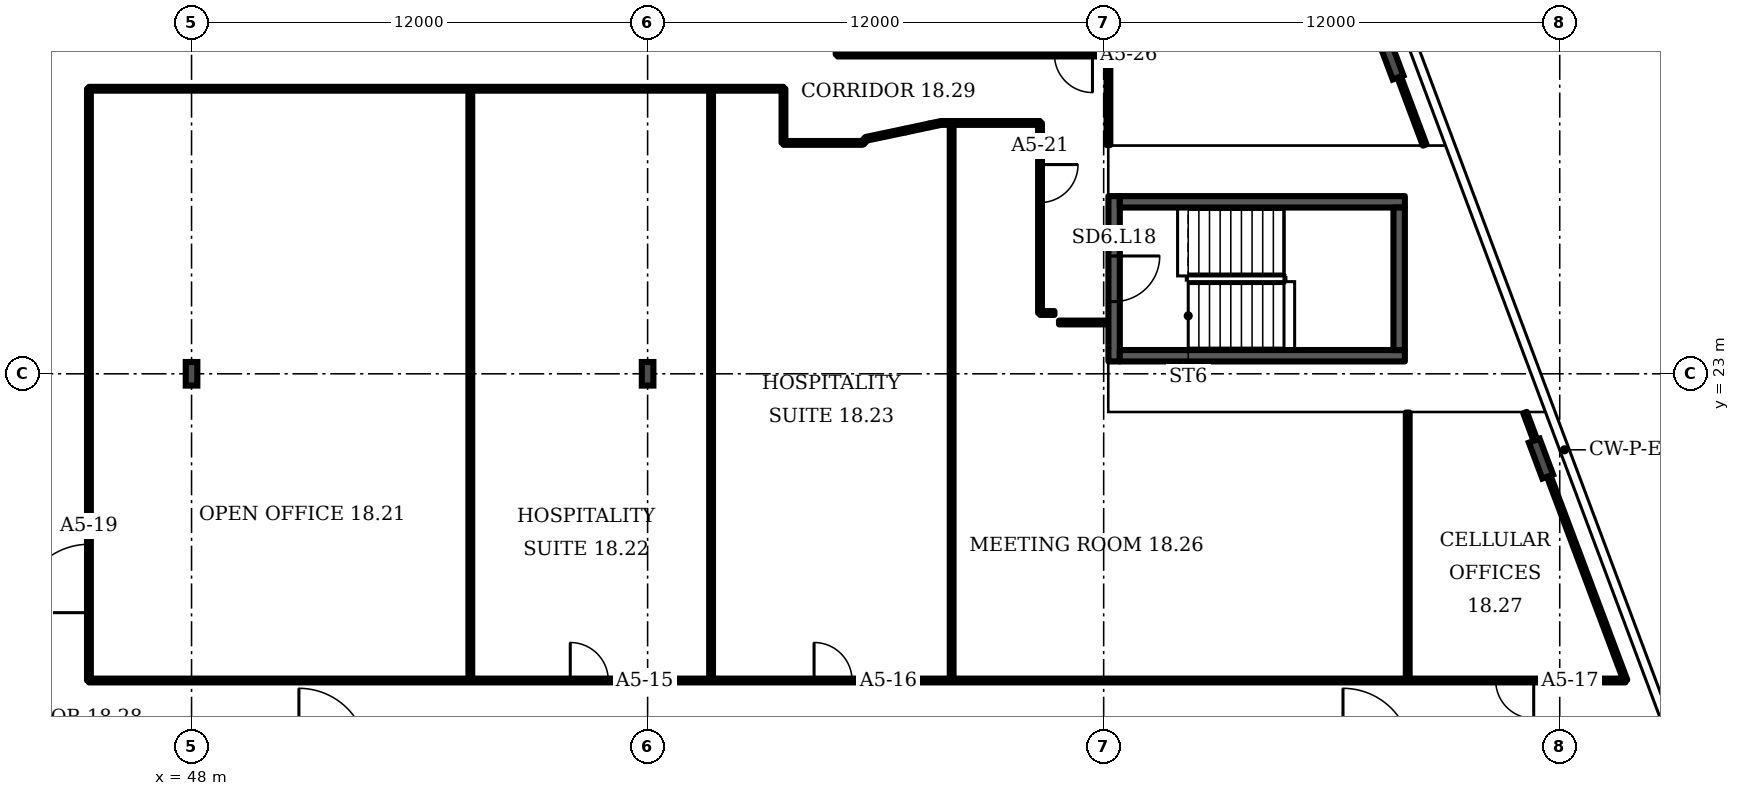
"""IFC4 building model, lengths in metres.
Left out: names, types, materials, properties, quantities, classifications, styles, units other than length and angle.
Written with IfcOpenShell. Run it as: python <this file> out.ifc"""

import sys

from ifc_helpers import new_model, si_unit, direction, frame, frame_2d, origin, origin_2d, place, context, subcontext, project, spatial, rectangle, i_section, extrude, element, fill, save


model = new_model("IFC4")
c1 = context("Model", 3, precision=1e-05, world=origin(), true_north=direction((0.0, 1.0)))
c2 = subcontext(c1, "Body", "Model", "MODEL_VIEW")
j1 = project(units=[si_unit("LENGTHUNIT", "METRE"), si_unit("PLANEANGLEUNIT", "RADIAN")], contexts=[c1])
p1 = place(None, origin())
s1 = spatial("IfcSite", under=j1, at=p1, CompositionType="ELEMENT")
p2 = place(p1, origin())
s2 = spatial("IfcBuilding", under=s1, at=p2, CompositionType="ELEMENT")
p3 = place(p2, frame((0.0, 0.0, 84.7)))
s3 = spatial("IfcBuildingStorey", under=s2, at=p3, CompositionType="ELEMENT", Elevation=84.7)
for number, where, z_axis, x_axis in (
    (1, (83.507, 20.768, 0.0), (0.0, 0.0, 1.0), (0.936, 0.351, 0.0)),
    (2, (79.57, 31.268, 0.0), (0.0, 0.0, 1.0), (0.936, 0.351, 0.0)),
):
    element("IfcColumn", number, at=place(p3, frame(where, z_axis=z_axis, x_axis=x_axis)), inside=s3, PredefinedType="COLUMN", context=c2, shape_type="SweptSolid", body=[
        extrude(i_section(OverallWidth=0.302, OverallDepth=1.008, WebThickness=0.021, FlangeThickness=0.04, FilletRadius=0.03, at=origin_2d()), origin(), (0.0, 0.0, 1.0), 3.6),
    ])
for number, where, z_axis, x_axis in (
    (3, (48.0, 23.0, 0.0), (0.0, 0.0, 1.0), (1.0, 0.0, 0.0)),
    (4, (60.0, 23.0, 0.0), (0.0, 0.0, 1.0), (1.0, 0.0, 0.0)),
):
    element("IfcColumn", number, at=place(p3, frame(where, z_axis=z_axis, x_axis=x_axis)), inside=s3, PredefinedType="COLUMN", context=c2, shape_type="SweptSolid", body=[
        extrude(i_section(OverallWidth=0.305, OverallDepth=0.62, WebThickness=0.021, FlangeThickness=0.04, FilletRadius=0.027, at=origin_2d()), origin(), (0.0, 0.0, 1.0), 3.6),
    ])
p4 = place(p3, frame((72.275, 23.325, 0.0), z_axis=(0.0, 0.0, 1.0), x_axis=(0.0, 1.0, 0.0)))
e5 = element("IfcWall", 5, at=p4, inside=s3, PredefinedType="SHEAR", context=c2, shape_type="SweptSolid", body=[
    extrude(rectangle(XDim=4.35, YDim=0.3, at=frame_2d((2.175, 0.0))), origin(), (0.0, 0.0, 1.0), 3.2),
])
p5 = place(p4, frame((1.575, 0.0, 0.0)))
e6 = element("IfcOpeningElement", 6, at=p5, cuts=e5, PredefinedType="OPENING", context=c2, shape_type="SweptSolid", body=[
    extrude(rectangle(XDim=1.2, YDim=2.1, at=frame_2d((0.6, 1.05))), frame((0.0, 0.16, 0.0), z_axis=(0.0, -1.0, 0.0), x_axis=(1.0, 0.0, 0.0)), (0.0, 0.0, 1.0), 0.32),
])
p6 = place(p3, frame((45.3, 14.93, 0.0), z_axis=(0.0, 0.0, 1.0), x_axis=(0.0, 1.0, 0.0)))
e7 = element("IfcWall", 7, at=p6, inside=s3, PredefinedType="PARTITIONING", context=c2, shape_type="SweptSolid", body=[
    extrude(rectangle(XDim=15.57, YDim=0.1, at=frame_2d((7.785, 0.0))), origin(), (0.0, 0.0, 1.0), 3.2),
])
p7 = place(p6, frame((1.785, 0.0, 0.0)))
e8 = element("IfcOpeningElement", 8, at=p7, cuts=e7, PredefinedType="OPENING", context=c2, shape_type="SweptSolid", body=[
    extrude(rectangle(XDim=1.8, YDim=2.1, at=frame_2d((0.9, 1.05))), frame((0.0, 0.06, 0.0), z_axis=(0.0, -1.0, 0.0), x_axis=(1.0, 0.0, 0.0)), (0.0, 0.0, 1.0), 0.12),
])
p8 = place(p3, frame((45.3, 14.93, 0.0), z_axis=(0.0, 0.0, 1.0), x_axis=(1.0, 0.0, 0.0)))
e9 = element("IfcWall", 9, at=p8, inside=s3, PredefinedType="PARTITIONING", context=c2, shape_type="SweptSolid", body=[
    extrude(rectangle(XDim=40.43, YDim=0.1, at=frame_2d((20.215, 0.0))), origin(), (0.0, 0.0, 1.0), 3.2),
])
p9 = place(p8, frame((12.665, 0.0, 0.0)))
e10 = element("IfcOpeningElement", 10, at=p9, cuts=e9, PredefinedType="OPENING", context=c2, shape_type="SweptSolid", body=[
    extrude(rectangle(XDim=1.0, YDim=2.1, at=frame_2d((0.5, 1.05))), frame((0.0, 0.06, 0.0), z_axis=(0.0, -1.0, 0.0), x_axis=(1.0, 0.0, 0.0)), (0.0, 0.0, 1.0), 0.12),
])
p10 = place(p8, frame((19.08, 0.0, 0.0)))
e11 = element("IfcOpeningElement", 11, at=p10, cuts=e9, PredefinedType="OPENING", context=c2, shape_type="SweptSolid", body=[
    extrude(rectangle(XDim=1.0, YDim=2.1, at=frame_2d((0.5, 1.05))), frame((0.0, 0.06, 0.0), z_axis=(0.0, -1.0, 0.0), x_axis=(1.0, 0.0, 0.0)), (0.0, 0.0, 1.0), 0.12),
])
p11 = place(p8, frame((37.015, 0.0, 0.0)))
e12 = element("IfcOpeningElement", 12, at=p11, cuts=e9, PredefinedType="OPENING", context=c2, shape_type="SweptSolid", body=[
    extrude(rectangle(XDim=1.0, YDim=2.1, at=frame_2d((0.5, 1.05))), frame((0.0, 0.06, 0.0), z_axis=(0.0, -1.0, 0.0), x_axis=(1.0, 0.0, 0.0)), (0.0, 0.0, 1.0), 0.12),
])
p12 = place(p3, frame((45.3, 30.5, 0.0), z_axis=(0.0, 0.0, 1.0), x_axis=(1.0, 0.0, 0.0)))
e13 = element("IfcWall", 13, at=p12, inside=s3, PredefinedType="PARTITIONING", context=c2, shape_type="SweptSolid", body=[
    extrude(rectangle(XDim=18.275, YDim=0.1, at=frame_2d((9.137, 0.0))), origin(), (0.0, 0.0, 1.0), 3.2),
])
for number, where, z_axis, x_axis in (
    (14, (55.335, 14.93, 0.0), (0.0, 0.0, 1.0), (0.0, 1.0, 0.0)),
    (15, (61.67, 14.93, 0.0), (0.0, 0.0, 1.0), (0.0, 1.0, 0.0)),
):
    element("IfcWall", number, at=place(p3, frame(where, z_axis=z_axis, x_axis=x_axis)), inside=s3, PredefinedType="PARTITIONING", context=c2, shape_type="SweptSolid", body=[
        extrude(rectangle(XDim=15.57, YDim=0.1, at=frame_2d((7.785, 0.0))), origin(), (0.0, 0.0, 1.0), 3.2),
    ])
p13 = place(p3, frame((63.575, 29.075, 0.0), z_axis=(0.0, 0.0, 1.0), x_axis=(0.0, 1.0, 0.0)))
e16 = element("IfcWall", 16, at=p13, inside=s3, PredefinedType="PARTITIONING", context=c2, shape_type="SweptSolid", body=[
    extrude(rectangle(XDim=1.425, YDim=0.1, at=frame_2d((0.712, 0.0))), origin(), (0.0, 0.0, 1.0), 3.2),
])
p14 = place(p3, frame((63.575, 29.075, 0.0), z_axis=(0.0, 0.0, 1.0), x_axis=(1.0, 0.0, 0.0)))
e17 = element("IfcWall", 17, at=p14, inside=s3, PredefinedType="PARTITIONING", context=c2, shape_type="SweptSolid", body=[
    extrude(rectangle(XDim=2.08, YDim=0.1, at=frame_2d((1.04, 0.0))), origin(), (0.0, 0.0, 1.0), 3.2),
])
p15 = place(p3, frame((65.0, 31.4, 0.0), z_axis=(0.0, 0.0, 1.0), x_axis=(0.0, 1.0, 0.0)))
e18 = element("IfcWall", 18, at=p15, inside=s3, PredefinedType="PARTITIONING", context=c2, shape_type="SweptSolid", body=[
    extrude(rectangle(XDim=2.58, YDim=0.1, at=frame_2d((1.29, 0.0))), origin(), (0.0, 0.0, 1.0), 3.2),
])
p16 = place(p15, frame((0.9, 0.0, 0.0)))
e19 = element("IfcOpeningElement", 19, at=p16, cuts=e18, PredefinedType="OPENING", context=c2, shape_type="SweptSolid", body=[
    extrude(rectangle(XDim=1.0, YDim=2.1, at=frame_2d((0.5, 1.05))), frame((0.0, 0.06, 0.0), z_axis=(0.0, -1.0, 0.0), x_axis=(1.0, 0.0, 0.0)), (0.0, 0.0, 1.0), 0.12),
])
p17 = place(p3, frame((65.0, 31.4, 0.0), z_axis=(0.0, 0.0, 1.0), x_axis=(1.0, 0.0, 0.0)))
e20 = element("IfcWall", 20, at=p17, inside=s3, PredefinedType="PARTITIONING", context=c2, shape_type="SweptSolid", body=[
    extrude(rectangle(XDim=7.125, YDim=0.1, at=frame_2d((3.562, 0.0))), origin(), (0.0, 0.0, 1.0), 3.2),
])
p18 = place(p17, frame((5.705, 0.0, 0.0)))
e21 = element("IfcOpeningElement", 21, at=p18, cuts=e20, PredefinedType="OPENING", context=c2, shape_type="SweptSolid", body=[
    extrude(rectangle(XDim=1.0, YDim=2.1, at=frame_2d((0.5, 1.05))), frame((0.0, 0.06, 0.0), z_axis=(0.0, -1.0, 0.0), x_axis=(1.0, 0.0, 0.0)), (0.0, 0.0, 1.0), 0.12),
])
p19 = place(p3, frame((65.655, 29.075, 0.0), z_axis=(0.0, 0.0, 1.0), x_axis=(0.671773, 0.740757, 0.0)))
e22 = element("IfcWall", 22, at=p19, inside=s3, PredefinedType="PARTITIONING", context=c2, shape_type="SweptSolid", body=[
    extrude(rectangle(XDim=0.149, YDim=0.1, at=frame_2d((0.074, 0.0))), origin(), (0.0, 0.0, 1.0), 3.2),
])
p20 = place(p3, frame((65.755, 29.185, 0.0), z_axis=(0.0, 0.0, 1.0), x_axis=(0.978739, 0.205118, 0.0)))
e23 = element("IfcWall", 23, at=p20, inside=s3, PredefinedType="PARTITIONING", context=c2, shape_type="SweptSolid", body=[
    extrude(rectangle(XDim=1.047, YDim=0.1, at=frame_2d((0.524, 0.0))), origin(), (0.0, 0.0, 1.0), 3.2),
])
p21 = place(p3, frame((66.78, 29.4, 0.0), z_axis=(0.0, 0.0, 1.0), x_axis=(0.977792, 0.209581, 0.0)))
e24 = element("IfcWall", 24, at=p21, inside=s3, PredefinedType="PARTITIONING", context=c2, shape_type="SweptSolid", body=[
    extrude(rectangle(XDim=0.644, YDim=0.1, at=frame_2d((0.322, 0.0))), origin(), (0.0, 0.0, 1.0), 3.2),
])
p22 = place(p3, frame((67.41, 29.535, 0.0), z_axis=(0.0, 0.0, 1.0), x_axis=(0.978604, 0.205738, 0.0)))
e25 = element("IfcWall", 25, at=p22, inside=s3, PredefinedType="PARTITIONING", context=c2, shape_type="SweptSolid", body=[
    extrude(rectangle(XDim=0.317, YDim=0.1, at=frame_2d((0.158, 0.0))), origin(), (0.0, 0.0, 1.0), 3.2),
])
p23 = place(p3, frame((67.72, 29.6, 0.0), z_axis=(0.0, 0.0, 1.0), x_axis=(1.0, 0.0, 0.0)))
e26 = element("IfcWall", 26, at=p23, inside=s3, PredefinedType="PARTITIONING", context=c2, shape_type="SweptSolid", body=[
    extrude(rectangle(XDim=2.605, YDim=0.1, at=frame_2d((1.302, 0.0))), origin(), (0.0, 0.0, 1.0), 3.2),
])
p24 = place(p3, frame((68.0, 14.93, 0.0), z_axis=(0.0, 0.0, 1.0), x_axis=(0.0, 1.0, 0.0)))
e27 = element("IfcWall", 27, at=p24, inside=s3, PredefinedType="PARTITIONING", context=c2, shape_type="SweptSolid", body=[
    extrude(rectangle(XDim=14.67, YDim=0.1, at=frame_2d((7.335, 0.0))), origin(), (0.0, 0.0, 1.0), 3.2),
])
p25 = place(p3, frame((68.0, 31.4, 0.0), z_axis=(0.0, 0.0, 1.0), x_axis=(0.0, 1.0, 0.0)))
e28 = element("IfcWall", 28, at=p25, inside=s3, PredefinedType="PARTITIONING", context=c2, shape_type="SweptSolid", body=[
    extrude(rectangle(XDim=8.39, YDim=0.1, at=frame_2d((4.195, 0.0))), origin(), (0.0, 0.0, 1.0), 3.2),
])
p26 = place(p3, frame((70.325, 24.6, 0.0), z_axis=(0.0, 0.0, 1.0), x_axis=(0.0, 1.0, 0.0)))
e29 = element("IfcWall", 29, at=p26, inside=s3, PredefinedType="PARTITIONING", context=c2, shape_type="SweptSolid", body=[
    extrude(rectangle(XDim=5.0, YDim=0.1, at=frame_2d((2.5, 0.0))), origin(), (0.0, 0.0, 1.0), 3.2),
])
p27 = place(p26, frame((2.905, 0.0, 0.0)))
e30 = element("IfcOpeningElement", 30, at=p27, cuts=e29, PredefinedType="OPENING", context=c2, shape_type="SweptSolid", body=[
    extrude(rectangle(XDim=1.0, YDim=2.1, at=frame_2d((0.5, 1.05))), frame((0.0, 0.06, 0.0), z_axis=(0.0, -1.0, 0.0), x_axis=(1.0, 0.0, 0.0)), (0.0, 0.0, 1.0), 0.12),
])
p28 = place(p3, frame((70.325, 24.6, 0.0), z_axis=(0.0, 0.0, 1.0), x_axis=(1.0, 0.0, 0.0)))
e31 = element("IfcWall", 31, at=p28, inside=s3, PredefinedType="PARTITIONING", context=c2, shape_type="SweptSolid", body=[
    extrude(rectangle(XDim=0.38, YDim=0.1, at=frame_2d((0.19, 0.0))), origin(), (0.0, 0.0, 1.0), 3.2),
])
p29 = place(p3, frame((70.825, 24.35, 0.0), z_axis=(0.0, 0.0, 1.0), x_axis=(1.0, 0.0, 0.0)))
e32 = element("IfcWall", 32, at=p29, inside=s3, PredefinedType="PARTITIONING", context=c2, shape_type="SweptSolid", body=[
    extrude(rectangle(XDim=1.28, YDim=0.1, at=frame_2d((0.64, 0.0))), origin(), (0.0, 0.0, 1.0), 3.2),
])
p30 = place(p3, frame((72.125, 29.02, 0.0), z_axis=(0.0, 0.0, 1.0), x_axis=(0.0, 1.0, 0.0)))
e33 = element("IfcWall", 33, at=p30, inside=s3, PredefinedType="PARTITIONING", context=c2, shape_type="SweptSolid", body=[
    extrude(rectangle(XDim=2.38, YDim=0.1, at=frame_2d((1.19, 0.0))), origin(), (0.0, 0.0, 1.0), 3.2),
])
p31 = place(p3, frame((80.0, 14.93, 0.0), z_axis=(0.0, 0.0, 1.0), x_axis=(0.0, 1.0, 0.0)))
e34 = element("IfcWall", 34, at=p31, inside=s3, PredefinedType="PARTITIONING", context=c2, shape_type="SweptSolid", body=[
    extrude(rectangle(XDim=7.05, YDim=0.1, at=frame_2d((3.525, 0.0))), origin(), (0.0, 0.0, 1.0), 3.2),
])
p32 = place(p3, frame((80.446, 29.02, 0.0), z_axis=(0.0, 0.0, 1.0), x_axis=(-0.350707, 0.936481, 0.0)))
e35 = element("IfcWall", 35, at=p32, inside=s3, PredefinedType="PARTITIONING", context=c2, shape_type="SweptSolid", body=[
    extrude(rectangle(XDim=2.901, YDim=0.1, at=frame_2d((1.45, 0.0))), origin(), (0.0, 0.0, 1.0), 2.58),
])
p33 = place(p3, frame((83.71, 20.31, 0.0), z_axis=(0.0, 0.0, 1.0), x_axis=(-0.349322, 0.937005, 0.0)))
e36 = element("IfcWall", 36, at=p33, inside=s3, PredefinedType="PARTITIONING", context=c2, shape_type="SweptSolid", body=[
    extrude(rectangle(XDim=1.782, YDim=0.1, at=frame_2d((0.891, 0.0))), origin(), (0.0, 0.0, 1.0), 2.58),
])
p34 = place(p3, frame((85.73, 14.93, 0.0), z_axis=(0.0, 0.0, 1.0), x_axis=(-0.351501, 0.936189, 0.0)))
e37 = element("IfcWall", 37, at=p34, inside=s3, PredefinedType="PARTITIONING", context=c2, shape_type="SweptSolid", body=[
    extrude(rectangle(XDim=5.747, YDim=0.1, at=frame_2d((2.874, 0.0))), origin(), (0.0, 0.0, 1.0), 2.58),
])
for number, where, z_axis, x_axis in (
    (38, (72.425, 23.475, 0.0), (0.0, 0.0, 1.0), (1.0, 0.0, 0.0)),
    (39, (72.425, 27.525, 0.0), (0.0, 0.0, 1.0), (1.0, 0.0, 0.0)),
):
    element("IfcWall", number, at=place(p3, frame(where, z_axis=z_axis, x_axis=x_axis)), inside=s3, PredefinedType="SHEAR", context=c2, shape_type="SweptSolid", body=[
        extrude(rectangle(XDim=7.5, YDim=0.3, at=frame_2d((3.75, 0.0))), origin(), (0.0, 0.0, 1.0), 3.2),
    ])
p35 = place(p3, frame((79.775, 23.625, 0.0), z_axis=(0.0, 0.0, 1.0), x_axis=(0.0, 1.0, 0.0)))
e40 = element("IfcWall", 40, at=p35, inside=s3, PredefinedType="SHEAR", context=c2, shape_type="SweptSolid", body=[
    extrude(rectangle(XDim=3.75, YDim=0.3, at=frame_2d((1.875, 0.0))), origin(), (0.0, 0.0, 1.0), 3.2),
])
p36 = place(p5, origin())
e41 = element("IfcDoor", 41, at=p36, inside=s3, OperationType="SINGLE_SWING_RIGHT", PredefinedType="DOOR", context=c2, shape_type="SweptSolid", body=[
    extrude(rectangle(XDim=1.2, YDim=2.1, at=frame_2d((0.6, 1.05))), frame((0.0, 0.025, 0.0), z_axis=(0.0, -1.0, 0.0), x_axis=(1.0, 0.0, 0.0)), (0.0, 0.0, 1.0), 0.05),
])
fill(e6, e41)
p37 = place(p9, origin())
e42 = element("IfcDoor", 42, at=p37, inside=s3, OperationType="SINGLE_SWING_LEFT", PredefinedType="DOOR", context=c2, shape_type="SweptSolid", body=[
    extrude(rectangle(XDim=1.0, YDim=2.1, at=frame_2d((0.5, 1.05))), frame((0.0, 0.025, 0.0), z_axis=(0.0, -1.0, 0.0), x_axis=(1.0, 0.0, 0.0)), (0.0, 0.0, 1.0), 0.05),
])
fill(e10, e42)
p38 = place(p10, origin())
e43 = element("IfcDoor", 43, at=p38, inside=s3, OperationType="SINGLE_SWING_LEFT", PredefinedType="DOOR", context=c2, shape_type="SweptSolid", body=[
    extrude(rectangle(XDim=1.0, YDim=2.1, at=frame_2d((0.5, 1.05))), frame((0.0, 0.025, 0.0), z_axis=(0.0, -1.0, 0.0), x_axis=(1.0, 0.0, 0.0)), (0.0, 0.0, 1.0), 0.05),
])
fill(e11, e43)
p39 = place(p11, origin())
e44 = element("IfcDoor", 44, at=p39, inside=s3, OperationType="SINGLE_SWING_RIGHT", PredefinedType="DOOR", context=c2, shape_type="SweptSolid", body=[
    extrude(rectangle(XDim=1.0, YDim=2.1, at=frame_2d((0.5, 1.05))), frame((0.0, 0.025, 0.0), z_axis=(0.0, -1.0, 0.0), x_axis=(1.0, 0.0, 0.0)), (0.0, 0.0, 1.0), 0.05),
])
fill(e12, e44)
p40 = place(p7, origin())
e45 = element("IfcDoor", 45, at=p40, inside=s3, OperationType="DOUBLE_DOOR_SINGLE_SWING", PredefinedType="DOOR", context=c2, shape_type="SweptSolid", body=[
    extrude(rectangle(XDim=1.8, YDim=2.1, at=frame_2d((0.9, 1.05))), frame((0.0, 0.025, 0.0), z_axis=(0.0, -1.0, 0.0), x_axis=(1.0, 0.0, 0.0)), (0.0, 0.0, 1.0), 0.05),
])
fill(e8, e45)
p41 = place(p27, origin())
e46 = element("IfcDoor", 46, at=p41, inside=s3, OperationType="SINGLE_SWING_RIGHT", PredefinedType="DOOR", context=c2, shape_type="SweptSolid", body=[
    extrude(rectangle(XDim=1.0, YDim=2.1, at=frame_2d((0.5, 1.05))), frame((0.0, 0.025, 0.0), z_axis=(0.0, -1.0, 0.0), x_axis=(1.0, 0.0, 0.0)), (0.0, 0.0, 1.0), 0.05),
])
fill(e30, e46)
p42 = place(p18, origin())
e47 = element("IfcDoor", 47, at=p42, inside=s3, OperationType="SINGLE_SWING_RIGHT", PredefinedType="DOOR", context=c2, shape_type="SweptSolid", body=[
    extrude(rectangle(XDim=1.0, YDim=2.1, at=frame_2d((0.5, 1.05))), frame((0.0, 0.025, 0.0), z_axis=(0.0, -1.0, 0.0), x_axis=(1.0, 0.0, 0.0)), (0.0, 0.0, 1.0), 0.05),
])
fill(e21, e47)
save(model, sys.argv[1])
